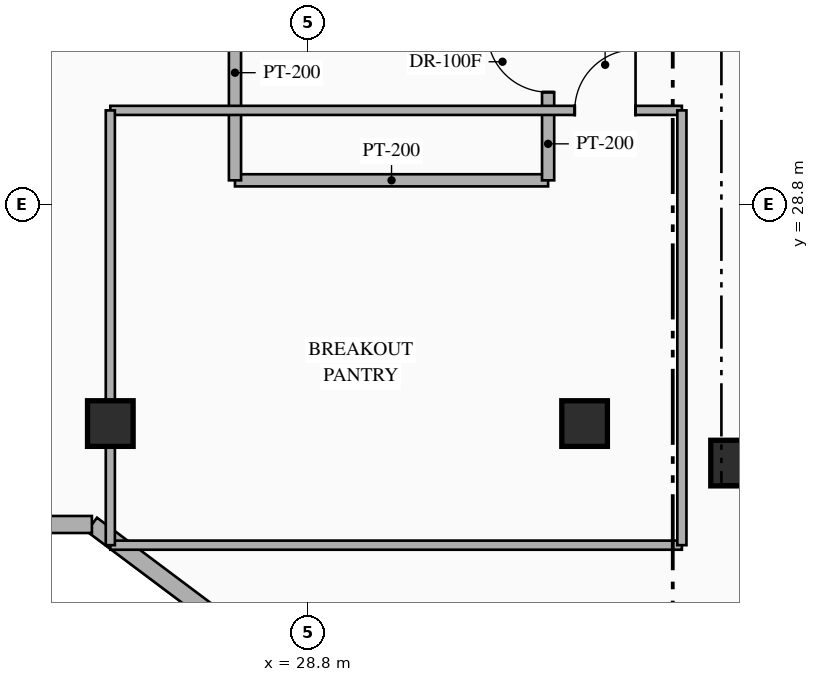
"""IFC4 building model, lengths in metres.
Left out: names, types, materials, properties, quantities, classifications, styles, units other than length and angle.
Written with IfcOpenShell. Run it as: python <this file> out.ifc"""

import sys

from ifc_helpers import new_model, si_unit, direction, frame, frame_2d, origin, origin_2d, place, context, subcontext, project, spatial, rectangle, hollow_rectangle, extrude, element, fill, save


model = new_model("IFC4")
c1 = context("Model", 3, precision=1e-05, world=origin(), true_north=direction((0.0, 1.0)))
c2 = subcontext(c1, "Body", "Model", "MODEL_VIEW")
j1 = project(units=[si_unit("LENGTHUNIT", "METRE"), si_unit("PLANEANGLEUNIT", "RADIAN")], contexts=[c1])
p1 = place(None, origin())
s1 = spatial("IfcSite", under=j1, at=p1, CompositionType="ELEMENT")
p2 = place(p1, origin())
s2 = spatial("IfcBuilding", under=s1, at=p2, CompositionType="ELEMENT")
p3 = place(p2, frame((0.0, 0.0, 202.35)))
s3 = spatial("IfcBuildingStorey", under=s2, at=p3, CompositionType="ELEMENT", Elevation=202.35)
for number, where, z_axis, x_axis in (
    (1, (35.8, 24.55, 0.0), (0.0, 0.0, 1.0), (1.0, 0.0, 0.0)),
    (2, (25.55, 25.2, 0.0), (0.0, 0.0, 1.0), (1.0, 0.0, 0.0)),
    (3, (33.35, 25.2, 0.0), (0.0, 0.0, 1.0), (1.0, 0.0, 0.0)),
):
    element("IfcColumn", number, at=place(p3, frame(where, z_axis=z_axis, x_axis=x_axis)), inside=s3, PredefinedType="COLUMN", context=c2, shape_type="SweptSolid", body=[
        extrude(hollow_rectangle(XDim=0.75, YDim=0.75, WallThickness=0.028, at=origin_2d()), origin(), (0.0, 0.0, 1.0), 3.6),
    ])
p4 = place(p3, frame((44.918, 8.787, 0.0), z_axis=(0.0, 0.0, 1.0), x_axis=(-0.800004765927, 0.599993645378, 0.0)))
e4 = element("IfcWall", 4, at=p4, inside=s3, PredefinedType="STANDARD", context=c2, shape_type="SweptSolid", body=[
    extrude(rectangle(XDim=24.588, YDim=0.28, at=frame_2d((12.294, 0.0))), origin(), (0.0, 0.0, 1.0), 3.35),
])
p5 = place(p3, frame((25.247, 23.54, 0.0), z_axis=(0.0, 0.0, 1.0), x_axis=(-1.0, 0.0, 0.0)))
e5 = element("IfcWall", 5, at=p5, inside=s3, PredefinedType="STANDARD", context=c2, shape_type="SweptSolid", body=[
    extrude(rectangle(XDim=4.789, YDim=0.28, at=frame_2d((2.395, 0.0))), origin(), (0.0, 0.0, 1.0), 3.35),
])
p6 = place(p3, frame((27.6, 29.2, 0.0), z_axis=(0.0, 0.0, 1.0), x_axis=(1.0, 0.0, 0.0)))
e6 = element("IfcWall", 6, at=p6, inside=s3, PredefinedType="STANDARD", context=c2, shape_type="SweptSolid", body=[
    extrude(rectangle(XDim=5.15, YDim=0.2, at=frame_2d((2.575, 0.0))), origin(), (0.0, 0.0, 1.0), 3.35),
])
p7 = place(p3, frame((27.6, 29.2, 0.0), z_axis=(0.0, 0.0, 1.0), x_axis=(0.0, 1.0, 0.0)))
e7 = element("IfcWall", 7, at=p7, inside=s3, PredefinedType="STANDARD", context=c2, shape_type="SweptSolid", body=[
    extrude(rectangle(XDim=3.54, YDim=0.2, at=frame_2d((1.77, 0.0))), origin(), (0.0, 0.0, 1.0), 3.35),
])
p8 = place(p3, frame((32.75, 29.2, 0.0), z_axis=(0.0, 0.0, 1.0), x_axis=(0.0, 1.0, 0.0)))
e8 = element("IfcWall", 8, at=p8, inside=s3, PredefinedType="STANDARD", context=c2, shape_type="SweptSolid", body=[
    extrude(rectangle(XDim=3.54, YDim=0.2, at=frame_2d((1.77, 0.0))), origin(), (0.0, 0.0, 1.0), 3.35),
])
p9 = place(p8, frame((1.45, 0.0, 0.0)))
e9 = element("IfcOpeningElement", 9, at=p9, cuts=e8, PredefinedType="OPENING", context=c2, shape_type="SweptSolid", body=[
    extrude(rectangle(XDim=1.0, YDim=2.2, at=frame_2d((0.5, 1.1))), frame((0.0, 0.11, 0.0), z_axis=(0.0, -1.0, 0.0), x_axis=(1.0, 0.0, 0.0)), (0.0, 0.0, 1.0), 0.22),
])
p10 = place(p3, frame((25.55, 23.2, 0.0), z_axis=(0.0, 0.0, 1.0), x_axis=(1.0, 0.0, 0.0)))
e10 = element("IfcWall", 10, at=p10, inside=s3, PredefinedType="PARTITIONING", context=c2, shape_type="SweptSolid", body=[
    extrude(rectangle(XDim=9.4, YDim=0.15, at=frame_2d((4.7, 0.0))), origin(), (0.0, 0.0, 1.0), 3.35),
])
p11 = place(p3, frame((25.55, 30.35, 0.0), z_axis=(0.0, 0.0, 1.0), x_axis=(1.0, 0.0, 0.0)))
e11 = element("IfcWall", 11, at=p11, inside=s3, PredefinedType="PARTITIONING", context=c2, shape_type="SweptSolid", body=[
    extrude(rectangle(XDim=9.4, YDim=0.15, at=frame_2d((4.7, 0.0))), origin(), (0.0, 0.0, 1.0), 3.35),
])
p12 = place(p11, frame((7.638, 0.0, 0.0)))
e12 = element("IfcOpeningElement", 12, at=p12, cuts=e11, PredefinedType="OPENING", context=c2, shape_type="SweptSolid", body=[
    extrude(rectangle(XDim=1.0, YDim=2.15, at=frame_2d((0.5, 1.075))), frame((0.0, 0.085, 0.0), z_axis=(0.0, -1.0, 0.0), x_axis=(1.0, 0.0, 0.0)), (0.0, 0.0, 1.0), 0.17),
])
p13 = place(p3, frame((25.55, 23.2, 0.0), z_axis=(0.0, 0.0, 1.0), x_axis=(0.0, 1.0, 0.0)))
e13 = element("IfcWall", 13, at=p13, inside=s3, PredefinedType="PARTITIONING", context=c2, shape_type="SweptSolid", body=[
    extrude(rectangle(XDim=7.15, YDim=0.15, at=frame_2d((3.575, 0.0))), origin(), (0.0, 0.0, 1.0), 2.757),
])
p14 = place(p3, frame((34.95, 23.2, 0.0), z_axis=(0.0, 0.0, 1.0), x_axis=(0.0, 1.0, 0.0)))
e14 = element("IfcWall", 14, at=p14, inside=s3, PredefinedType="PARTITIONING", context=c2, shape_type="SweptSolid", body=[
    extrude(rectangle(XDim=7.15, YDim=0.15, at=frame_2d((3.575, 0.0))), origin(), (0.0, 0.0, 1.0), 3.35),
])
p15 = place(p9, origin())
e15 = element("IfcDoor", 15, at=p15, inside=s3, OperationType="SINGLE_SWING_RIGHT", PredefinedType="DOOR", context=c2, shape_type="SweptSolid", body=[
    extrude(rectangle(XDim=1.0, YDim=2.2, at=frame_2d((0.5, 1.1))), frame((0.0, 0.025, 0.0), z_axis=(0.0, -1.0, 0.0), x_axis=(1.0, 0.0, 0.0)), (0.0, 0.0, 1.0), 0.05),
])
fill(e9, e15)
p16 = place(p12, origin())
e16 = element("IfcDoor", 16, at=p16, inside=s3, OperationType="SINGLE_SWING_RIGHT", PredefinedType="DOOR", context=c2, shape_type="SweptSolid", body=[
    extrude(rectangle(XDim=1.0, YDim=2.15, at=frame_2d((0.5, 1.075))), frame((0.0, 0.025, 0.0), z_axis=(0.0, -1.0, 0.0), x_axis=(1.0, 0.0, 0.0)), (0.0, 0.0, 1.0), 0.05),
])
fill(e12, e16)
save(model, sys.argv[1])
